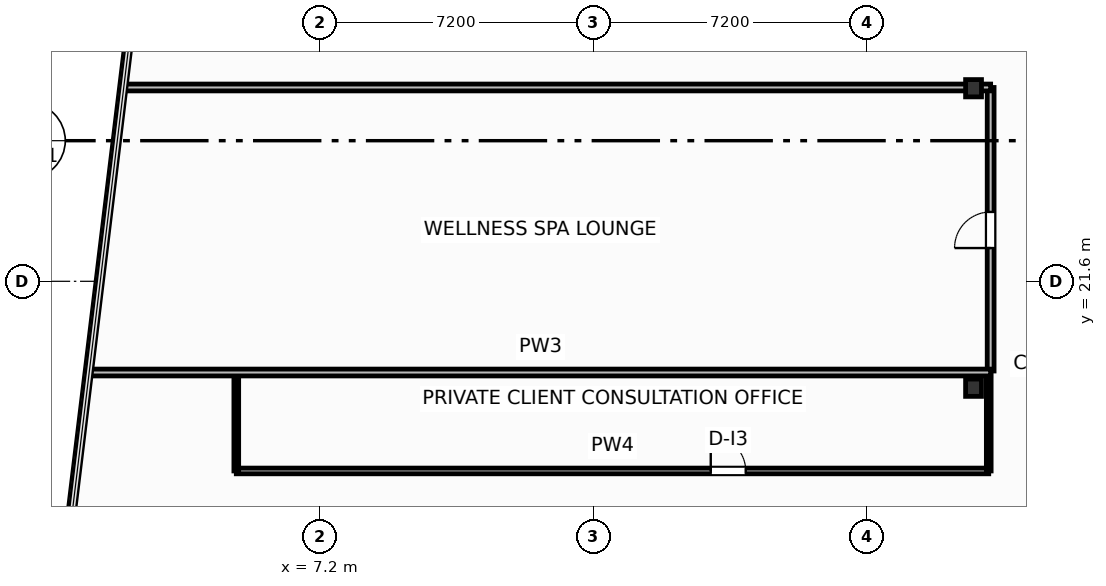
"""IFC4 building model, lengths in metres.
Left out: names, types, materials, properties, quantities, classifications, styles, units other than length and angle.
Written with IfcOpenShell. Run it as: python <this file> out.ifc"""

import sys

from ifc_helpers import new_model, si_unit, direction, frame, frame_2d, origin, origin_2d, place, context, subcontext, project, spatial, rectangle, i_section, extrude, element, fill, save


model = new_model("IFC4")
c1 = context("Model", 3, precision=1e-05, world=origin(), true_north=direction((0.0, 1.0)))
c2 = subcontext(c1, "Body", "Model", "MODEL_VIEW")
j1 = project(units=[si_unit("LENGTHUNIT", "METRE"), si_unit("PLANEANGLEUNIT", "RADIAN")], contexts=[c1])
p1 = place(None, origin())
s1 = spatial("IfcSite", under=j1, at=p1, CompositionType="ELEMENT")
p2 = place(p1, origin())
s2 = spatial("IfcBuilding", under=s1, at=p2, CompositionType="ELEMENT")
p3 = place(p2, frame((0.0, 0.0, 155.0)))
s3 = spatial("IfcBuildingStorey", under=s2, at=p3, CompositionType="ELEMENT", Elevation=155.0)
for number, where, z_axis, x_axis in (
    (1, (24.4, 18.8, 0.0), (0.0, 0.0, 1.0), (1.0, 0.0, 0.0)),
    (2, (24.4, 26.68, 0.0), (0.0, 0.0, 1.0), (1.0, 0.0, 0.0)),
):
    element("IfcColumn", number, at=place(p3, frame(where, z_axis=z_axis, x_axis=x_axis)), inside=s3, PredefinedType="COLUMN", context=c2, shape_type="SweptSolid", body=[
        extrude(i_section(OverallWidth=0.418, OverallDepth=0.455, WebThickness=0.042, FlangeThickness=0.068, FilletRadius=0.025, at=origin_2d()), origin(), (0.0, 0.0, 1.0), 3.7),
    ])
p4 = place(p3, frame((5.0, 16.61, 0.0), z_axis=(0.0, 0.0, 1.0), x_axis=(1.0, 0.0, 0.0)))
e3 = element("IfcWall", 3, at=p4, inside=s3, PredefinedType="PARTITIONING", context=c2, shape_type="SweptSolid", body=[
    extrude(rectangle(XDim=19.8, YDim=0.15, at=frame_2d((9.9, 0.0))), origin(), (0.0, 0.0, 1.0), 3.45),
])
p5 = place(p4, frame((12.485, 0.0, 0.0)))
e4 = element("IfcOpeningElement", 4, at=p5, cuts=e3, PredefinedType="OPENING", context=c2, shape_type="SweptSolid", body=[
    extrude(rectangle(XDim=0.92, YDim=2.05, at=frame_2d((0.46, 1.025))), frame((0.0, 0.085, 0.0), z_axis=(0.0, -1.0, 0.0), x_axis=(1.0, 0.0, 0.0)), (0.0, 0.0, 1.0), 0.17),
])
p6 = place(p3, frame((5.0, 16.61, 0.0), z_axis=(0.0, 0.0, 1.0), x_axis=(0.0, 1.0, 0.0)))
e5 = element("IfcWall", 5, at=p6, inside=s3, PredefinedType="PARTITIONING", context=c2, shape_type="SweptSolid", body=[
    extrude(rectangle(XDim=2.63, YDim=0.125, at=frame_2d((1.315, 0.0))), origin(), (0.0, 0.0, 1.0), 3.45),
])
p7 = place(p3, frame((24.8, 16.61, 0.0), z_axis=(0.0, 0.0, 1.0), x_axis=(0.0, 1.0, 0.0)))
e6 = element("IfcWall", 6, at=p7, inside=s3, PredefinedType="PARTITIONING", context=c2, shape_type="SweptSolid", body=[
    extrude(rectangle(XDim=2.63, YDim=0.125, at=frame_2d((1.315, 0.0))), origin(), (0.0, 0.0, 1.0), 2.662),
])
p8 = place(p3, frame((24.85, 19.24, 0.0), z_axis=(0.0, 0.0, 1.0), x_axis=(0.0, 1.0, 0.0)))
e7 = element("IfcWall", 7, at=p8, inside=s3, PredefinedType="PARTITIONING", context=c2, shape_type="SweptSolid", body=[
    extrude(rectangle(XDim=7.46, YDim=0.18, at=frame_2d((3.73, 0.0))), origin(), (0.0, 0.0, 1.0), 3.45),
])
p9 = place(p8, frame((3.235, 0.0, 0.0)))
e8 = element("IfcOpeningElement", 8, at=p9, cuts=e7, PredefinedType="OPENING", context=c2, shape_type="SweptSolid", body=[
    extrude(rectangle(XDim=0.95, YDim=2.05, at=frame_2d((0.475, 1.025))), frame((0.0, 0.1, 0.0), z_axis=(0.0, -1.0, 0.0), x_axis=(1.0, 0.0, 0.0)), (0.0, 0.0, 1.0), 0.2),
])
p10 = place(p3, frame((1.169, 19.2, 0.0), z_axis=(0.0, 0.0, 1.0), x_axis=(1.0, 0.0, 0.0)))
e9 = element("IfcWall", 9, at=p10, inside=s3, PredefinedType="PARTITIONING", context=c2, shape_type="SweptSolid", body=[
    extrude(rectangle(XDim=23.681, YDim=0.18, at=frame_2d((11.84, 0.0))), origin(), (0.0, 0.0, 1.0), 3.45),
])
p11 = place(p3, frame((2.078, 26.7, 0.0), z_axis=(0.0, 0.0, 1.0), x_axis=(1.0, 0.0, 0.0)))
e10 = element("IfcWall", 10, at=p11, inside=s3, PredefinedType="PARTITIONING", context=c2, shape_type="SweptSolid", body=[
    extrude(rectangle(XDim=22.772, YDim=0.18, at=frame_2d((11.386, 0.0))), origin(), (0.0, 0.0, 1.0), 2.662),
])
p12 = place(p5, origin())
e11 = element("IfcDoor", 11, at=p12, inside=s3, OperationType="SINGLE_SWING_LEFT", PredefinedType="DOOR", context=c2, shape_type="SweptSolid", body=[
    extrude(rectangle(XDim=0.92, YDim=2.05, at=frame_2d((0.46, 1.025))), frame((0.0, 0.025, 0.0), z_axis=(0.0, -1.0, 0.0), x_axis=(1.0, 0.0, 0.0)), (0.0, 0.0, 1.0), 0.05),
])
fill(e4, e11)
p13 = place(p9, origin())
e12 = element("IfcDoor", 12, at=p13, inside=s3, OperationType="SINGLE_SWING_LEFT", PredefinedType="DOOR", context=c2, shape_type="SweptSolid", body=[
    extrude(rectangle(XDim=0.95, YDim=2.05, at=frame_2d((0.475, 1.025))), frame((0.0, 0.025, 0.0), z_axis=(0.0, -1.0, 0.0), x_axis=(1.0, 0.0, 0.0)), (0.0, 0.0, 1.0), 0.05),
])
fill(e8, e12)
save(model, sys.argv[1])
